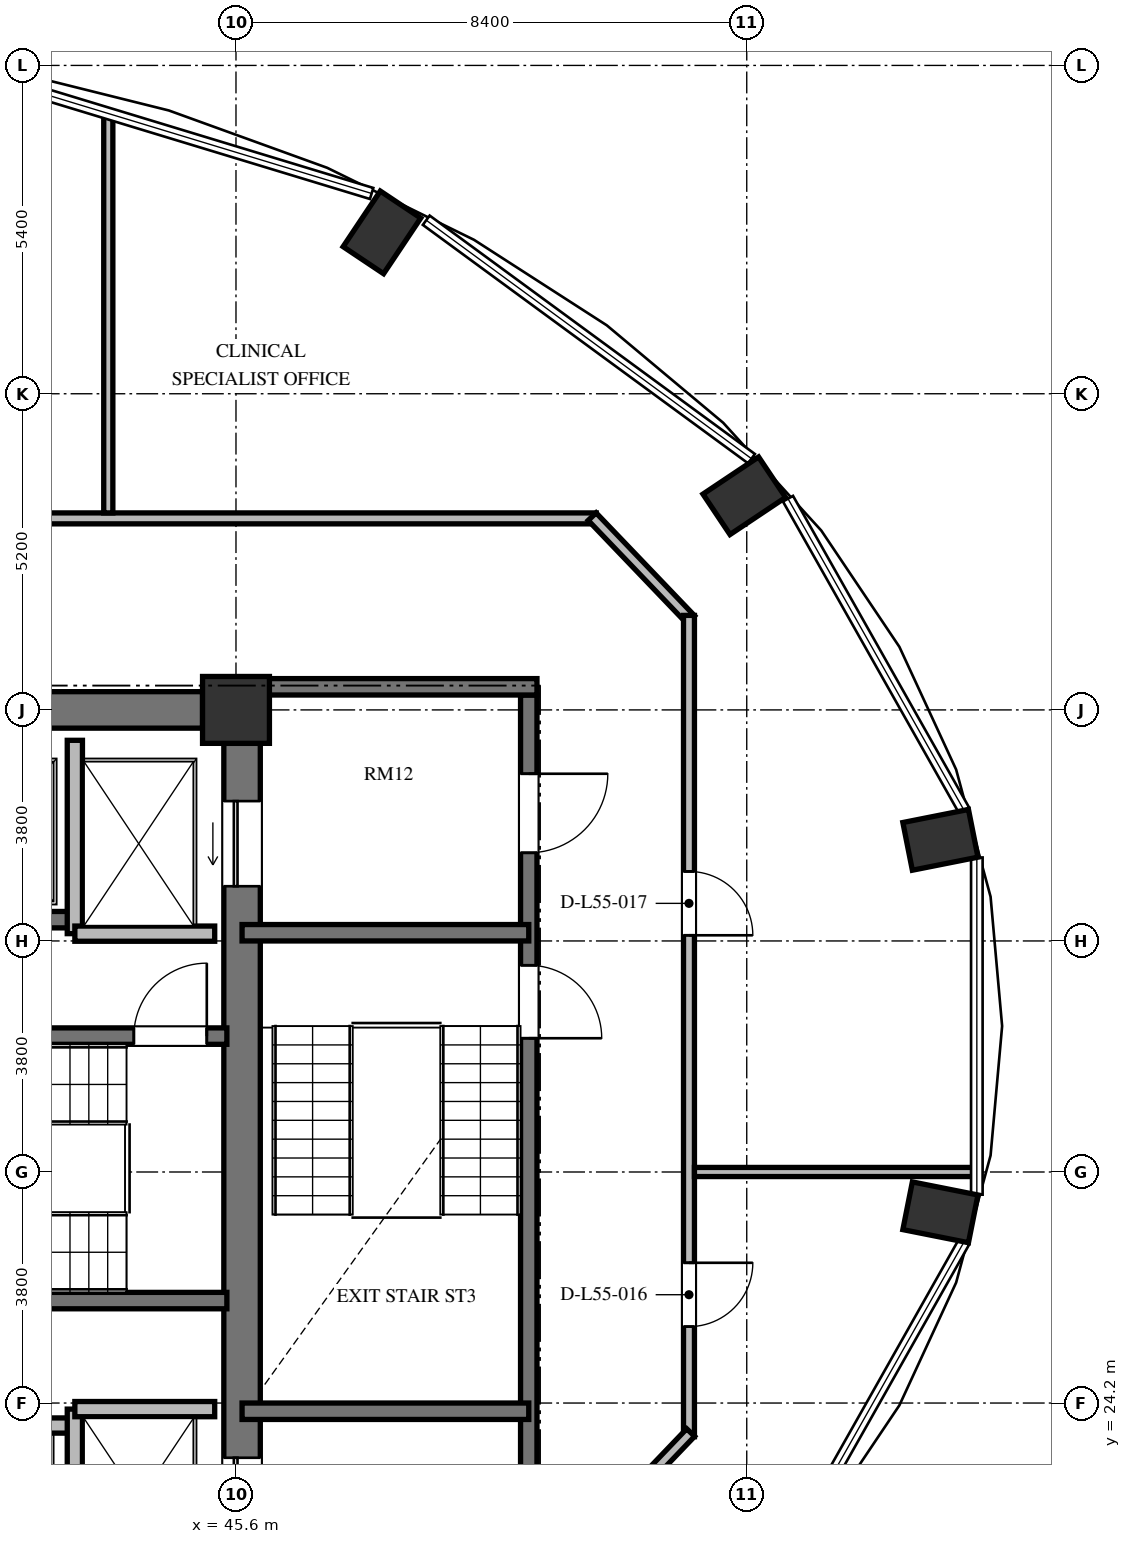
"""IFC4 building model, lengths in metres.
Left out: names, types, materials, properties, quantities, classifications, styles, units other than length and angle.
Written with IfcOpenShell. Run it as: python <this file> out.ifc"""

import sys

from ifc_helpers import new_model, si_unit, direction, frame, frame_2d, origin, origin_2d, place, context, subcontext, project, spatial, rectangle, extrude, element, fill, save


model = new_model("IFC4")
c1 = context("Model", 3, precision=1e-05, world=origin(), true_north=direction((0.0, 1.0)))
c2 = subcontext(c1, "Body", "Model", "MODEL_VIEW")
j1 = project(units=[si_unit("LENGTHUNIT", "METRE"), si_unit("PLANEANGLEUNIT", "RADIAN")], contexts=[c1])
p1 = place(None, origin())
s1 = spatial("IfcSite", under=j1, at=p1, CompositionType="ELEMENT")
p2 = place(p1, origin())
s2 = spatial("IfcBuilding", under=s1, at=p2, CompositionType="ELEMENT")
p3 = place(p2, frame((0.0, 0.0, 213.072)))
s3 = spatial("IfcBuildingStorey", under=s2, at=p3, CompositionType="ELEMENT", Elevation=213.072)
for number, where, z_axis, x_axis in (
    (1, (57.185, 27.337, 0.0), (0.0, 0.0, 1.0), (0.981, -0.195, 0.0)),
    (2, (57.185, 33.463, 0.0), (0.0, 0.0, 1.0), (0.981, 0.195, 0.0)),
    (3, (53.96, 39.123, 0.0), (0.0, 0.0, 1.0), (0.831, 0.556, 0.0)),
    (4, (48.0, 43.454, 0.0), (0.0, 0.0, 1.0), (0.556, 0.831, 0.0)),
):
    element("IfcColumn", number, at=place(p3, frame(where, z_axis=z_axis, x_axis=x_axis)), inside=s3, PredefinedType="COLUMN", context=c2, shape_type="SweptSolid", body=[
        extrude(rectangle(XDim=1.1, YDim=0.8, at=origin_2d()), origin(), (0.0, 0.0, 1.0), 3.648),
    ])
p4 = place(p3, frame((45.6, 35.6, 0.0), z_axis=(0.0, 0.0, 1.0), x_axis=(1.0, 0.0, 0.0)))
e5 = element("IfcColumn", 5, at=p4, inside=s3, PredefinedType="COLUMN", context=c2, shape_type="SweptSolid", body=[
    extrude(rectangle(XDim=1.1, YDim=1.1, at=origin_2d()), origin(), (0.0, 0.0, 1.0), 3.648),
])
p5 = place(p3, frame((45.7, 20.95, 0.0), z_axis=(0.0, 0.0, 1.0), x_axis=(0.0, 1.0, 0.0)))
e6 = element("IfcWall", 6, at=p5, inside=s3, PredefinedType="SHEAR", context=c2, shape_type="SweptSolid", body=[
    extrude(rectangle(XDim=14.1, YDim=0.6, at=frame_2d((7.05, 0.0))), origin(), (0.0, 0.0, 1.0), 3.648),
])
p6 = place(p5, frame((11.75, 0.0, 0.0)))
e7 = element("IfcOpeningElement", 7, at=p6, cuts=e6, PredefinedType="OPENING", context=c2, shape_type="SweptSolid", body=[
    extrude(rectangle(XDim=1.4, YDim=2.3, at=frame_2d((0.7, 1.15))), frame((0.0, 0.31, 0.0), z_axis=(0.0, -1.0, 0.0), x_axis=(1.0, 0.0, 0.0)), (0.0, 0.0, 1.0), 0.62),
])
p7 = place(p5, frame((0.95, 0.0, 0.0)))
e8 = element("IfcOpeningElement", 8, at=p7, cuts=e6, PredefinedType="OPENING", context=c2, shape_type="SweptSolid", body=[
    extrude(rectangle(XDim=1.4, YDim=2.3, at=frame_2d((0.7, 1.15))), frame((0.0, 0.31, 0.0), z_axis=(0.0, -1.0, 0.0), x_axis=(1.0, 0.0, 0.0)), (0.0, 0.0, 1.0), 0.62),
])
p8 = place(p3, frame((39.6, 35.6, 0.0), z_axis=(0.0, 0.0, 1.0), x_axis=(1.0, 0.0, 0.0)))
e9 = element("IfcWall", 9, at=p8, inside=s3, PredefinedType="SHEAR", context=c2, shape_type="SweptSolid", body=[
    extrude(rectangle(XDim=5.45, YDim=0.6, at=frame_2d((2.725, 0.0))), origin(), (0.0, 0.0, 1.0), 3.648),
])
p9 = place(p3, frame((37.465, 30.235, 0.0), z_axis=(0.0, 0.0, 1.0), x_axis=(1.0, 0.0, 0.0)))
e10 = element("IfcWall", 10, at=p9, inside=s3, PredefinedType="SHEAR", context=c2, shape_type="SweptSolid", body=[
    extrude(rectangle(XDim=7.985, YDim=0.27, at=frame_2d((3.992, 0.0))), origin(), (0.0, 0.0, 1.0), 3.648),
])
p10 = place(p9, frame((6.455, 0.0, 0.0)))
e11 = element("IfcOpeningElement", 11, at=p10, cuts=e10, PredefinedType="OPENING", context=c2, shape_type="SweptSolid", body=[
    extrude(rectangle(XDim=1.2, YDim=2.15, at=frame_2d((0.6, 1.075))), frame((0.0, 0.145, 0.0), z_axis=(0.0, -1.0, 0.0), x_axis=(1.0, 0.0, 0.0)), (0.0, 0.0, 1.0), 0.29),
])
p11 = place(p3, frame((37.465, 25.885, 0.0), z_axis=(0.0, 0.0, 1.0), x_axis=(1.0, 0.0, 0.0)))
e12 = element("IfcWall", 12, at=p11, inside=s3, PredefinedType="SHEAR", context=c2, shape_type="SweptSolid", body=[
    extrude(rectangle(XDim=7.985, YDim=0.27, at=frame_2d((3.992, 0.0))), origin(), (0.0, 0.0, 1.0), 3.648),
])
p12 = place(p3, frame((26.55, 32.15, 0.0), z_axis=(0.0, 0.0, 1.0), x_axis=(1.0, 0.0, 0.0)))
e13 = element("IfcWall", 13, at=p12, inside=s3, PredefinedType="SHEAR", context=c2, shape_type="SweptSolid", body=[
    extrude(rectangle(XDim=16.4, YDim=0.27, at=frame_2d((8.2, 0.0))), origin(), (0.0, 0.0, 1.0), 3.648),
])
p13 = place(p12, frame((1.375, 0.0, 0.0)))
e14 = element("IfcOpeningElement", 14, at=p13, cuts=e13, PredefinedType="OPENING", context=c2, shape_type="SweptSolid", body=[
    extrude(rectangle(XDim=1.05, YDim=2.15, at=frame_2d((0.525, 1.075))), frame((0.0, 0.145, 0.0), z_axis=(0.0, -1.0, 0.0), x_axis=(1.0, 0.0, 0.0)), (0.0, 0.0, 1.0), 0.29),
])
p14 = place(p12, frame((4.975, 0.0, 0.0)))
e15 = element("IfcOpeningElement", 15, at=p14, cuts=e13, PredefinedType="OPENING", context=c2, shape_type="SweptSolid", body=[
    extrude(rectangle(XDim=1.05, YDim=2.15, at=frame_2d((0.525, 1.075))), frame((0.0, 0.145, 0.0), z_axis=(0.0, -1.0, 0.0), x_axis=(1.0, 0.0, 0.0)), (0.0, 0.0, 1.0), 0.29),
])
p15 = place(p12, frame((8.625, 0.0, 0.0)))
e16 = element("IfcOpeningElement", 16, at=p15, cuts=e13, PredefinedType="OPENING", context=c2, shape_type="SweptSolid", body=[
    extrude(rectangle(XDim=1.05, YDim=2.15, at=frame_2d((0.525, 1.075))), frame((0.0, 0.145, 0.0), z_axis=(0.0, -1.0, 0.0), x_axis=(1.0, 0.0, 0.0)), (0.0, 0.0, 1.0), 0.29),
])
p16 = place(p12, frame((11.9, 0.0, 0.0)))
e17 = element("IfcOpeningElement", 17, at=p16, cuts=e13, PredefinedType="OPENING", context=c2, shape_type="SweptSolid", body=[
    extrude(rectangle(XDim=1.1, YDim=2.2, at=frame_2d((0.55, 1.1))), frame((0.0, 0.145, 0.0), z_axis=(0.0, -1.0, 0.0), x_axis=(1.0, 0.0, 0.0)), (0.0, 0.0, 1.0), 0.29),
])
p17 = place(p12, frame((14.5, 0.0, 0.0)))
e18 = element("IfcOpeningElement", 18, at=p17, cuts=e13, PredefinedType="OPENING", context=c2, shape_type="SweptSolid", body=[
    extrude(rectangle(XDim=1.1, YDim=2.2, at=frame_2d((0.55, 1.1))), frame((0.0, 0.145, 0.0), z_axis=(0.0, -1.0, 0.0), x_axis=(1.0, 0.0, 0.0)), (0.0, 0.0, 1.0), 0.29),
])
p18 = place(p3, frame((26.75, 23.83, 0.0), z_axis=(0.0, 0.0, 1.0), x_axis=(1.0, 0.0, 0.0)))
e19 = element("IfcWall", 19, at=p18, inside=s3, PredefinedType="SOLIDWALL", context=c2, shape_type="SweptSolid", body=[
    extrude(rectangle(XDim=16.2, YDim=0.25, at=frame_2d((8.1, 0.0))), origin(), (0.0, 0.0, 1.0), 3.448),
])
p19 = place(p18, frame((2.025, 0.0, 0.0)))
e20 = element("IfcOpeningElement", 20, at=p19, cuts=e19, PredefinedType="OPENING", context=c2, shape_type="SweptSolid", body=[
    extrude(rectangle(XDim=1.05, YDim=2.15, at=frame_2d((0.525, 1.075))), frame((0.0, 0.135, 0.0), z_axis=(0.0, -1.0, 0.0), x_axis=(1.0, 0.0, 0.0)), (0.0, 0.0, 1.0), 0.27),
])
p20 = place(p18, frame((7.25, 0.0, 0.0)))
e21 = element("IfcOpeningElement", 21, at=p20, cuts=e19, PredefinedType="OPENING", context=c2, shape_type="SweptSolid", body=[
    extrude(rectangle(XDim=1.4, YDim=2.2, at=frame_2d((0.7, 1.1))), frame((0.0, 0.135, 0.0), z_axis=(0.0, -1.0, 0.0), x_axis=(1.0, 0.0, 0.0)), (0.0, 0.0, 1.0), 0.27),
])
p21 = place(p18, frame((11.7, 0.0, 0.0)))
e22 = element("IfcOpeningElement", 22, at=p21, cuts=e19, PredefinedType="OPENING", context=c2, shape_type="SweptSolid", body=[
    extrude(rectangle(XDim=1.1, YDim=2.2, at=frame_2d((0.55, 1.1))), frame((0.0, 0.135, 0.0), z_axis=(0.0, -1.0, 0.0), x_axis=(1.0, 0.0, 0.0)), (0.0, 0.0, 1.0), 0.27),
])
p22 = place(p18, frame((14.15, 0.0, 0.0)))
e23 = element("IfcOpeningElement", 23, at=p22, cuts=e19, PredefinedType="OPENING", context=c2, shape_type="SweptSolid", body=[
    extrude(rectangle(XDim=1.4, YDim=2.3, at=frame_2d((0.7, 1.15))), frame((0.0, 0.135, 0.0), z_axis=(0.0, -1.0, 0.0), x_axis=(1.0, 0.0, 0.0)), (0.0, 0.0, 1.0), 0.27),
])
p23 = place(p3, frame((42.95, 31.92, 0.0), z_axis=(0.0, 0.0, 1.0), x_axis=(0.0, 1.0, 0.0)))
e24 = element("IfcWall", 24, at=p23, inside=s3, PredefinedType="SOLIDWALL", context=c2, shape_type="SweptSolid", body=[
    extrude(rectangle(XDim=3.18, YDim=0.25, at=frame_2d((1.59, 0.0))), origin(), (0.0, 0.0, 1.0), 3.448),
])
p24 = place(p3, frame((42.95, 31.92, 0.0), z_axis=(0.0, 0.0, 1.0), x_axis=(1.0, 0.0, 0.0)))
e25 = element("IfcWall", 25, at=p24, inside=s3, PredefinedType="SOLIDWALL", context=c2, shape_type="SweptSolid", body=[
    extrude(rectangle(XDim=2.3, YDim=0.25, at=frame_2d((1.15, 0.0))), origin(), (0.0, 0.0, 1.0), 3.448),
])
p25 = place(p3, frame((42.95, 20.9, 0.0), z_axis=(0.0, 0.0, 1.0), x_axis=(0.0, 1.0, 0.0)))
e26 = element("IfcWall", 26, at=p25, inside=s3, PredefinedType="SOLIDWALL", context=c2, shape_type="SweptSolid", body=[
    extrude(rectangle(XDim=3.2, YDim=0.25, at=frame_2d((1.6, 0.0))), origin(), (0.0, 0.0, 1.0), 3.448),
])
p26 = place(p3, frame((42.95, 24.1, 0.0), z_axis=(0.0, 0.0, 1.0), x_axis=(1.0, 0.0, 0.0)))
e27 = element("IfcWall", 27, at=p26, inside=s3, PredefinedType="SOLIDWALL", context=c2, shape_type="SweptSolid", body=[
    extrude(rectangle(XDim=2.3, YDim=0.25, at=frame_2d((1.15, 0.0))), origin(), (0.0, 0.0, 1.0), 3.448),
])
p27 = place(p3, frame((50.415, 35.845, 0.0), z_axis=(0.0, 0.0, 1.0), x_axis=(0.0, -1.0, 0.0)))
e28 = element("IfcWall", 28, at=p27, inside=s3, PredefinedType="SHEAR", context=c2, shape_type="SweptSolid", body=[
    extrude(rectangle(XDim=15.825, YDim=0.27, at=frame_2d((7.913, 0.0))), origin(), (0.0, 0.0, 1.0), 3.648),
])
p28 = place(p27, frame((4.445, 0.0, 0.0)))
e29 = element("IfcOpeningElement", 29, at=p28, cuts=e28, PredefinedType="OPENING", context=c2, shape_type="SweptSolid", body=[
    extrude(rectangle(XDim=1.2, YDim=2.15, at=frame_2d((0.6, 1.075))), frame((0.0, 0.145, 0.0), z_axis=(0.0, -1.0, 0.0), x_axis=(1.0, 0.0, 0.0)), (0.0, 0.0, 1.0), 0.29),
])
p29 = place(p27, frame((1.295, 0.0, 0.0)))
e30 = element("IfcOpeningElement", 30, at=p29, cuts=e28, PredefinedType="OPENING", context=c2, shape_type="SweptSolid", body=[
    extrude(rectangle(XDim=1.3, YDim=2.2, at=frame_2d((0.65, 1.1))), frame((0.0, 0.145, 0.0), z_axis=(0.0, -1.0, 0.0), x_axis=(1.0, 0.0, 0.0)), (0.0, 0.0, 1.0), 0.29),
])
p30 = place(p27, frame((13.095, 0.0, 0.0)))
e31 = element("IfcOpeningElement", 31, at=p30, cuts=e28, PredefinedType="OPENING", context=c2, shape_type="SweptSolid", body=[
    extrude(rectangle(XDim=1.3, YDim=2.2, at=frame_2d((0.65, 1.1))), frame((0.0, 0.145, 0.0), z_axis=(0.0, -1.0, 0.0), x_axis=(1.0, 0.0, 0.0)), (0.0, 0.0, 1.0), 0.29),
])
p31 = place(p3, frame((46.0, 35.98, 0.0), z_axis=(0.0, 0.0, 1.0), x_axis=(1.0, 0.0, 0.0)))
e32 = element("IfcWall", 32, at=p31, inside=s3, PredefinedType="SHEAR", context=c2, shape_type="SweptSolid", body=[
    extrude(rectangle(XDim=4.55, YDim=0.27, at=frame_2d((2.275, 0.0))), origin(), (0.0, 0.0, 1.0), 3.648),
])
for number, where, z_axis, x_axis in (
    (33, (45.7, 31.935, 0.0), (0.0, 0.0, 1.0), (1.0, 0.0, 0.0)),
    (34, (45.7, 24.065, 0.0), (0.0, 0.0, 1.0), (1.0, 0.0, 0.0)),
):
    element("IfcWall", number, at=place(p3, frame(where, z_axis=z_axis, x_axis=x_axis)), inside=s3, PredefinedType="SHEAR", context=c2, shape_type="SweptSolid", body=[
        extrude(rectangle(XDim=4.715, YDim=0.27, at=frame_2d((2.357, 0.0))), origin(), (0.0, 0.0, 1.0), 3.648),
    ])
p32 = place(p3, frame((30.71, 38.75, 0.0), z_axis=(0.0, 0.0, 1.0), x_axis=(1.0, 0.0, 0.0)))
e35 = element("IfcWall", 35, at=p32, inside=s3, PredefinedType="PARTITIONING", context=c2, shape_type="SweptSolid", body=[
    extrude(rectangle(XDim=20.815, YDim=0.18, at=frame_2d((10.408, 0.0))), origin(), (0.0, 0.0, 1.0), 3.073),
])
p33 = place(p32, frame((7.515, 0.0, 0.0)))
e36 = element("IfcOpeningElement", 36, at=p33, cuts=e35, PredefinedType="OPENING", context=c2, shape_type="SweptSolid", body=[
    extrude(rectangle(XDim=1.05, YDim=2.15, at=frame_2d((0.525, 1.075))), frame((0.0, 0.1, 0.0), z_axis=(0.0, -1.0, 0.0), x_axis=(1.0, 0.0, 0.0)), (0.0, 0.0, 1.0), 0.2),
])
p34 = place(p3, frame((51.458, 38.779, 0.0), z_axis=(0.0, 0.0, 1.0), x_axis=(0.691359830363, -0.722510612352, 0.0)))
e37 = element("IfcWall", 37, at=p34, inside=s3, PredefinedType="PARTITIONING", context=c2, shape_type="SweptSolid", body=[
    extrude(rectangle(XDim=2.343, YDim=0.18, at=frame_2d((1.172, 0.0))), origin(), (0.0, 0.0, 1.0), 3.033),
])
p35 = place(p3, frame((53.05, 37.155, 0.0), z_axis=(0.0, 0.0, 1.0), x_axis=(0.0, -1.0, 0.0)))
e38 = element("IfcWall", 38, at=p35, inside=s3, PredefinedType="PARTITIONING", context=c2, shape_type="SweptSolid", body=[
    extrude(rectangle(XDim=13.509, YDim=0.18, at=frame_2d((6.754, 0.0))), origin(), (0.0, 0.0, 1.0), 3.448),
])
p36 = place(p35, frame((10.648, 0.0, 0.0)))
e39 = element("IfcOpeningElement", 39, at=p36, cuts=e38, PredefinedType="OPENING", context=c2, shape_type="SweptSolid", body=[
    extrude(rectangle(XDim=1.05, YDim=2.15, at=frame_2d((0.525, 1.075))), frame((0.0, 0.1, 0.0), z_axis=(0.0, -1.0, 0.0), x_axis=(1.0, 0.0, 0.0)), (0.0, 0.0, 1.0), 0.2),
])
p37 = place(p35, frame((4.211, 0.0, 0.0)))
e40 = element("IfcOpeningElement", 40, at=p37, cuts=e38, PredefinedType="OPENING", context=c2, shape_type="SweptSolid", body=[
    extrude(rectangle(XDim=1.05, YDim=2.15, at=frame_2d((0.525, 1.075))), frame((0.0, 0.1, 0.0), z_axis=(0.0, -1.0, 0.0), x_axis=(1.0, 0.0, 0.0)), (0.0, 0.0, 1.0), 0.2),
])
p38 = place(p3, frame((53.078, 23.714, 0.0), z_axis=(0.0, 0.0, 1.0), x_axis=(-0.691353379446, -0.722516785085, 0.0)))
e41 = element("IfcWall", 41, at=p38, inside=s3, PredefinedType="PARTITIONING", context=c2, shape_type="SweptSolid", body=[
    extrude(rectangle(XDim=3.604, YDim=0.18, at=frame_2d((1.802, 0.0))), origin(), (0.0, 0.0, 1.0), 3.448),
])
p39 = place(p3, frame((53.14, 28.0, 0.0), z_axis=(0.0, 0.0, 1.0), x_axis=(1.0, 0.0, 0.0)))
e42 = element("IfcWall", 42, at=p39, inside=s3, PredefinedType="PARTITIONING", context=c2, shape_type="SweptSolid", body=[
    extrude(rectangle(XDim=4.632, YDim=0.15, at=frame_2d((2.316, 0.0))), origin(), (0.0, 0.0, 1.0), 3.448),
])
p40 = place(p3, frame((43.5, 38.84, 0.0), z_axis=(0.0, 0.0, 1.0), x_axis=(0.0, 1.0, 0.0)))
e43 = element("IfcWall", 43, at=p40, inside=s3, PredefinedType="PARTITIONING", context=c2, shape_type="SweptSolid", body=[
    extrude(rectangle(XDim=6.552, YDim=0.15, at=frame_2d((3.276, 0.0))), origin(), (0.0, 0.0, 1.0), 3.448),
])
p41 = place(p10, origin())
e44 = element("IfcDoor", 44, at=p41, inside=s3, OperationType="SINGLE_SWING_RIGHT", PredefinedType="DOOR", context=c2, shape_type="SweptSolid", body=[
    extrude(rectangle(XDim=1.2, YDim=2.15, at=frame_2d((0.6, 1.075))), frame((0.0, 0.025, 0.0), z_axis=(0.0, -1.0, 0.0), x_axis=(1.0, 0.0, 0.0)), (0.0, 0.0, 1.0), 0.05),
])
fill(e11, e44)
p42 = place(p6, origin())
e45 = element("IfcDoor", 45, at=p42, inside=s3, OperationType="SLIDING_TO_LEFT", PredefinedType="DOOR", context=c2, shape_type="SweptSolid", body=[
    extrude(rectangle(XDim=1.4, YDim=2.3, at=frame_2d((0.7, 1.15))), frame((0.0, 0.025, 0.0), z_axis=(0.0, -1.0, 0.0), x_axis=(1.0, 0.0, 0.0)), (0.0, 0.0, 1.0), 0.05),
])
fill(e7, e45)
p43 = place(p7, origin())
e46 = element("IfcDoor", 46, at=p43, inside=s3, OperationType="SLIDING_TO_LEFT", PredefinedType="DOOR", context=c2, shape_type="SweptSolid", body=[
    extrude(rectangle(XDim=1.4, YDim=2.3, at=frame_2d((0.7, 1.15))), frame((0.0, 0.025, 0.0), z_axis=(0.0, -1.0, 0.0), x_axis=(1.0, 0.0, 0.0)), (0.0, 0.0, 1.0), 0.05),
])
fill(e8, e46)
p44 = place(p28, origin())
e47 = element("IfcDoor", 47, at=p44, inside=s3, OperationType="SINGLE_SWING_RIGHT", PredefinedType="DOOR", context=c2, shape_type="SweptSolid", body=[
    extrude(rectangle(XDim=1.2, YDim=2.15, at=frame_2d((0.6, 1.075))), frame((0.0, 0.025, 0.0), z_axis=(0.0, -1.0, 0.0), x_axis=(1.0, 0.0, 0.0)), (0.0, 0.0, 1.0), 0.05),
])
fill(e29, e47)
p45 = place(p29, origin())
e48 = element("IfcDoor", 48, at=p45, inside=s3, OperationType="SINGLE_SWING_LEFT", PredefinedType="DOOR", context=c2, shape_type="SweptSolid", body=[
    extrude(rectangle(XDim=1.3, YDim=2.2, at=frame_2d((0.65, 1.1))), frame((0.0, 0.025, 0.0), z_axis=(0.0, -1.0, 0.0), x_axis=(1.0, 0.0, 0.0)), (0.0, 0.0, 1.0), 0.05),
])
fill(e30, e48)
p46 = place(p36, origin())
e49 = element("IfcDoor", 49, at=p46, inside=s3, OperationType="SINGLE_SWING_LEFT", PredefinedType="DOOR", context=c2, shape_type="SweptSolid", body=[
    extrude(rectangle(XDim=1.05, YDim=2.15, at=frame_2d((0.525, 1.075))), frame((0.0, 0.025, 0.0), z_axis=(0.0, -1.0, 0.0), x_axis=(1.0, 0.0, 0.0)), (0.0, 0.0, 1.0), 0.05),
])
fill(e39, e49)
p47 = place(p37, origin())
e50 = element("IfcDoor", 50, at=p47, inside=s3, OperationType="SINGLE_SWING_RIGHT", PredefinedType="DOOR", context=c2, shape_type="SweptSolid", body=[
    extrude(rectangle(XDim=1.05, YDim=2.15, at=frame_2d((0.525, 1.075))), frame((0.0, 0.025, 0.0), z_axis=(0.0, -1.0, 0.0), x_axis=(1.0, 0.0, 0.0)), (0.0, 0.0, 1.0), 0.05),
])
fill(e40, e50)
save(model, sys.argv[1])
